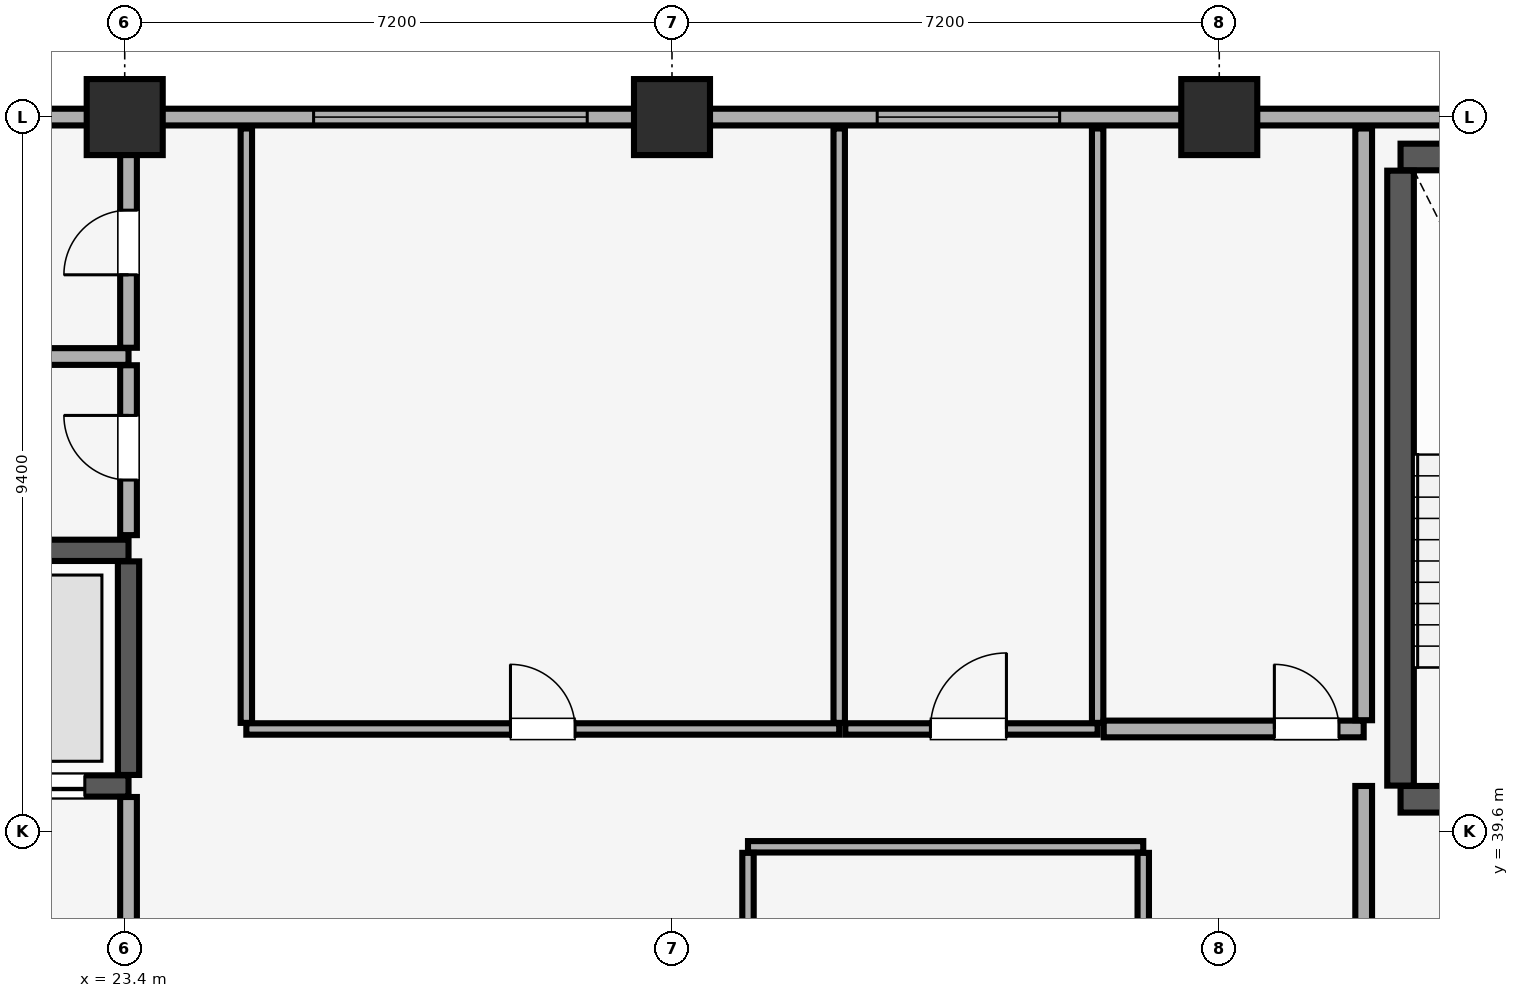
"""IFC4 building model, lengths in metres.
Left out: names, types, materials, properties, quantities, classifications, styles, units other than length and angle.
Written with IfcOpenShell. Run it as: python <this file> out.ifc"""

import sys

from ifc_helpers import new_model, si_unit, direction, frame, frame_2d, origin, origin_2d, place, context, subcontext, project, spatial, rectangle, extrude, element, fill, save


model = new_model("IFC4")
c1 = context("Model", 3, precision=1e-05, world=origin(), true_north=direction((0.0, 1.0)))
c2 = subcontext(c1, "Body", "Model", "MODEL_VIEW")
j1 = project(units=[si_unit("LENGTHUNIT", "METRE"), si_unit("PLANEANGLEUNIT", "RADIAN")], contexts=[c1])
p1 = place(None, origin())
s1 = spatial("IfcSite", under=j1, at=p1, CompositionType="ELEMENT")
p2 = place(p1, origin())
s2 = spatial("IfcBuilding", under=s1, at=p2, CompositionType="ELEMENT")
p3 = place(p2, frame((0.0, 0.0, 229.15)))
s3 = spatial("IfcBuildingStorey", under=s2, at=p3, CompositionType="ELEMENT", Elevation=229.15)
for number, where, z_axis, x_axis in (
    (1, (23.4, 49.0, 0.0), (0.0, 0.0, 1.0), (1.0, 0.0, 0.0)),
    (2, (30.6, 49.0, 0.0), (0.0, 0.0, 1.0), (1.0, 0.0, 0.0)),
    (3, (37.8, 49.0, 0.0), (0.0, 0.0, 1.0), (1.0, 0.0, 0.0)),
):
    element("IfcColumn", number, at=place(p3, frame(where, z_axis=z_axis, x_axis=x_axis)), inside=s3, PredefinedType="COLUMN", context=c2, shape_type="SweptSolid", body=[
        extrude(rectangle(XDim=1.0, YDim=1.0, at=origin_2d()), origin(), (0.0, 0.0, 1.0), 3.71),
    ])
p4 = place(p3, frame((74.2, 49.0, 0.0), z_axis=(0.0, 0.0, 1.0), x_axis=(-1.0, 0.0, 0.0)))
e4 = element("IfcWall", 4, at=p4, inside=s3, PredefinedType="SOLIDWALL", context=c2, shape_type="SweptSolid", body=[
    extrude(rectangle(XDim=64.4, YDim=0.22, at=frame_2d((32.2, 0.0))), origin(), (0.0, 0.0, 1.0), 2.91),
])
p5 = place(p4, frame((59.815, 0.0, 0.85)))
e5 = element("IfcOpeningElement", 5, at=p5, cuts=e4, PredefinedType="OPENING", context=c2, shape_type="SweptSolid", body=[
    extrude(rectangle(XDim=3.0, YDim=1.5, at=frame_2d((1.5, 0.75))), frame((0.0, 0.12, 0.0), z_axis=(0.0, -1.0, 0.0), x_axis=(1.0, 0.0, 0.0)), (0.0, 0.0, 1.0), 0.24),
])
p6 = place(p4, frame((1.585, 0.0, 0.85)))
e6 = element("IfcOpeningElement", 6, at=p6, cuts=e4, PredefinedType="OPENING", context=c2, shape_type="SweptSolid", body=[
    extrude(rectangle(XDim=3.0, YDim=1.5, at=frame_2d((1.5, 0.75))), frame((0.0, 0.12, 0.0), z_axis=(0.0, -1.0, 0.0), x_axis=(1.0, 0.0, 0.0)), (0.0, 0.0, 1.0), 0.24),
])
p7 = place(p4, frame((44.715, 0.0, 0.9)))
e7 = element("IfcOpeningElement", 7, at=p7, cuts=e4, PredefinedType="OPENING", context=c2, shape_type="SweptSolid", body=[
    extrude(rectangle(XDim=3.6, YDim=1.5, at=frame_2d((1.8, 0.75))), frame((0.0, 0.12, 0.0), z_axis=(0.0, -1.0, 0.0), x_axis=(1.0, 0.0, 0.0)), (0.0, 0.0, 1.0), 0.24),
])
p8 = place(p4, frame((38.5, 0.0, 0.9)))
e8 = element("IfcOpeningElement", 8, at=p8, cuts=e4, PredefinedType="OPENING", context=c2, shape_type="SweptSolid", body=[
    extrude(rectangle(XDim=2.4, YDim=1.5, at=frame_2d((1.2, 0.75))), frame((0.0, 0.12, 0.0), z_axis=(0.0, -1.0, 0.0), x_axis=(1.0, 0.0, 0.0)), (0.0, 0.0, 1.0), 0.24),
])
p9 = place(p4, frame((21.75, 0.0, 0.9)))
e9 = element("IfcOpeningElement", 9, at=p9, cuts=e4, PredefinedType="OPENING", context=c2, shape_type="SweptSolid", body=[
    extrude(rectangle(XDim=3.0, YDim=1.5, at=frame_2d((1.5, 0.75))), frame((0.0, 0.12, 0.0), z_axis=(0.0, -1.0, 0.0), x_axis=(1.0, 0.0, 0.0)), (0.0, 0.0, 1.0), 0.24),
])
p10 = place(p4, frame((17.435, 0.0, 0.9)))
e10 = element("IfcOpeningElement", 10, at=p10, cuts=e4, PredefinedType="OPENING", context=c2, shape_type="SweptSolid", body=[
    extrude(rectangle(XDim=2.4, YDim=1.5, at=frame_2d((1.2, 0.75))), frame((0.0, 0.12, 0.0), z_axis=(0.0, -1.0, 0.0), x_axis=(1.0, 0.0, 0.0)), (0.0, 0.0, 1.0), 0.24),
])
p11 = place(p3, frame((40.185, 40.025, 0.0), z_axis=(0.0, 0.0, 1.0), x_axis=(1.0, 0.0, 0.0)))
e11 = element("IfcWall", 11, at=p11, inside=s3, PredefinedType="SHEAR", context=c2, shape_type="SweptSolid", body=[
    extrude(rectangle(XDim=3.63, YDim=0.35, at=frame_2d((1.815, 0.0))), origin(), (0.0, 0.0, 1.0), 3.71),
])
p12 = place(p11, frame((1.24, 0.0, 0.0)))
e12 = element("IfcOpeningElement", 12, at=p12, cuts=e11, PredefinedType="OPENING", context=c2, shape_type="SweptSolid", body=[
    extrude(rectangle(XDim=1.15, YDim=2.15, at=frame_2d((0.575, 1.075))), frame((0.0, 0.185, 0.0), z_axis=(0.0, -1.0, 0.0), x_axis=(1.0, 0.0, 0.0)), (0.0, 0.0, 1.0), 0.37),
])
p13 = place(p3, frame((40.185, 48.475, 0.0), z_axis=(0.0, 0.0, 1.0), x_axis=(1.0, 0.0, 0.0)))
e13 = element("IfcWall", 13, at=p13, inside=s3, PredefinedType="SHEAR", context=c2, shape_type="SweptSolid", body=[
    extrude(rectangle(XDim=3.63, YDim=0.35, at=frame_2d((1.815, 0.0))), origin(), (0.0, 0.0, 1.0), 3.71),
])
p14 = place(p3, frame((40.185, 40.205, 0.0), z_axis=(0.0, 0.0, 1.0), x_axis=(0.0, 1.0, 0.0)))
e14 = element("IfcWall", 14, at=p14, inside=s3, PredefinedType="SHEAR", context=c2, shape_type="SweptSolid", body=[
    extrude(rectangle(XDim=8.09, YDim=0.35, at=frame_2d((4.045, 0.0))), origin(), (0.0, 0.0, 1.0), 3.71),
])
p15 = place(p3, frame((21.035, 40.2, 0.0), z_axis=(0.0, 0.0, 1.0), x_axis=(1.0, 0.0, 0.0)))
e15 = element("IfcWall", 15, at=p15, inside=s3, PredefinedType="SHEAR", context=c2, shape_type="SweptSolid", body=[
    extrude(rectangle(XDim=2.415, YDim=0.28, at=frame_2d((1.208, 0.0))), origin(), (0.0, 0.0, 1.0), 3.71),
])
p16 = place(p15, frame((0.54, 0.0, 0.0)))
e16 = element("IfcOpeningElement", 16, at=p16, cuts=e15, PredefinedType="OPENING", context=c2, shape_type="SweptSolid", body=[
    extrude(rectangle(XDim=1.3, YDim=2.3, at=frame_2d((0.65, 1.15))), frame((0.0, 0.15, 0.0), z_axis=(0.0, -1.0, 0.0), x_axis=(1.0, 0.0, 0.0)), (0.0, 0.0, 1.0), 0.3),
])
p17 = place(p3, frame((21.035, 43.3, 0.0), z_axis=(0.0, 0.0, 1.0), x_axis=(1.0, 0.0, 0.0)))
e17 = element("IfcWall", 17, at=p17, inside=s3, PredefinedType="SHEAR", context=c2, shape_type="SweptSolid", body=[
    extrude(rectangle(XDim=2.415, YDim=0.28, at=frame_2d((1.208, 0.0))), origin(), (0.0, 0.0, 1.0), 3.71),
])
p18 = place(p3, frame((23.45, 40.345, 0.0), z_axis=(0.0, 0.0, 1.0), x_axis=(0.0, 1.0, 0.0)))
e18 = element("IfcWall", 18, at=p18, inside=s3, PredefinedType="SHEAR", context=c2, shape_type="SweptSolid", body=[
    extrude(rectangle(XDim=2.81, YDim=0.28, at=frame_2d((1.405, 0.0))), origin(), (0.0, 0.0, 1.0), 3.71),
])
p19 = place(p3, frame((23.45, 34.415, 0.0), z_axis=(0.0, 0.0, 1.0), x_axis=(0.0, 1.0, 0.0)))
e19 = element("IfcWall", 19, at=p19, inside=s3, PredefinedType="PARTITIONING", context=c2, shape_type="SweptSolid", body=[
    extrude(rectangle(XDim=5.64, YDim=0.22, at=frame_2d((2.82, 0.0))), origin(), (0.0, 0.0, 1.0), 3.71),
])
p20 = place(p3, frame((39.7, 34.415, 0.0), z_axis=(0.0, 0.0, 1.0), x_axis=(0.0, 1.0, 0.0)))
e20 = element("IfcWall", 20, at=p20, inside=s3, PredefinedType="PARTITIONING", context=c2, shape_type="SweptSolid", body=[
    extrude(rectangle(XDim=5.785, YDim=0.22, at=frame_2d((2.893, 0.0))), origin(), (0.0, 0.0, 1.0), 3.71),
])
p21 = place(p3, frame((21.035, 45.85, 0.0), z_axis=(0.0, 0.0, 1.0), x_axis=(1.0, 0.0, 0.0)))
e21 = element("IfcWall", 21, at=p21, inside=s3, PredefinedType="PARTITIONING", context=c2, shape_type="SweptSolid", body=[
    extrude(rectangle(XDim=2.415, YDim=0.22, at=frame_2d((1.208, 0.0))), origin(), (0.0, 0.0, 1.0), 3.71),
])
p22 = place(p3, frame((23.45, 43.5, 0.0), z_axis=(0.0, 0.0, 1.0), x_axis=(0.0, 1.0, 0.0)))
e22 = element("IfcWall", 22, at=p22, inside=s3, PredefinedType="PARTITIONING", context=c2, shape_type="SweptSolid", body=[
    extrude(rectangle(XDim=2.235, YDim=0.22, at=frame_2d((1.118, 0.0))), origin(), (0.0, 0.0, 1.0), 3.71),
])
p23 = place(p22, frame((0.725, 0.0, 0.0)))
e23 = element("IfcOpeningElement", 23, at=p23, cuts=e22, PredefinedType="OPENING", context=c2, shape_type="SweptSolid", body=[
    extrude(rectangle(XDim=0.85, YDim=2.1, at=frame_2d((0.425, 1.05))), frame((0.0, 0.12, 0.0), z_axis=(0.0, -1.0, 0.0), x_axis=(1.0, 0.0, 0.0)), (0.0, 0.0, 1.0), 0.24),
])
p24 = place(p3, frame((23.45, 45.965, 0.0), z_axis=(0.0, 0.0, 1.0), x_axis=(0.0, 1.0, 0.0)))
e24 = element("IfcWall", 24, at=p24, inside=s3, PredefinedType="PARTITIONING", context=c2, shape_type="SweptSolid", body=[
    extrude(rectangle(XDim=2.885, YDim=0.22, at=frame_2d((1.442, 0.0))), origin(), (0.0, 0.0, 1.0), 3.71),
])
p25 = place(p24, frame((0.96, 0.0, 0.0)))
e25 = element("IfcOpeningElement", 25, at=p25, cuts=e24, PredefinedType="OPENING", context=c2, shape_type="SweptSolid", body=[
    extrude(rectangle(XDim=0.85, YDim=2.1, at=frame_2d((0.425, 1.05))), frame((0.0, 0.12, 0.0), z_axis=(0.0, -1.0, 0.0), x_axis=(1.0, 0.0, 0.0)), (0.0, 0.0, 1.0), 0.24),
])
p26 = place(p3, frame((31.6, 39.4, 0.0), z_axis=(0.0, 0.0, 1.0), x_axis=(1.0, 0.0, 0.0)))
e26 = element("IfcWall", 26, at=p26, inside=s3, PredefinedType="PARTITIONING", context=c2, shape_type="SweptSolid", body=[
    extrude(rectangle(XDim=5.2, YDim=0.15, at=frame_2d((2.6, 0.0))), origin(), (0.0, 0.0, 1.0), 3.71),
])
for number, where, z_axis, x_axis in (
    (27, (31.6, 34.38, 0.0), (0.0, 0.0, 1.0), (0.0, 1.0, 0.0)),
    (28, (36.8, 34.38, 0.0), (0.0, 0.0, 1.0), (0.0, 1.0, 0.0)),
):
    element("IfcWall", number, at=place(p3, frame(where, z_axis=z_axis, x_axis=x_axis)), inside=s3, PredefinedType="PARTITIONING", context=c2, shape_type="SweptSolid", body=[
        extrude(rectangle(XDim=4.94, YDim=0.15, at=frame_2d((2.47, 0.0))), origin(), (0.0, 0.0, 1.0), 3.71),
    ])
p27 = place(p3, frame((25.0, 40.95, 0.0), z_axis=(0.0, 0.0, 1.0), x_axis=(1.0, 0.0, 0.0)))
e29 = element("IfcWall", 29, at=p27, inside=s3, PredefinedType="PARTITIONING", context=c2, shape_type="SweptSolid", body=[
    extrude(rectangle(XDim=7.8, YDim=0.15, at=frame_2d((3.9, 0.0))), origin(), (0.0, 0.0, 1.0), 3.71),
])
p28 = place(p27, frame((3.475, 0.0, 0.0)))
e30 = element("IfcOpeningElement", 30, at=p28, cuts=e29, PredefinedType="OPENING", context=c2, shape_type="SweptSolid", body=[
    extrude(rectangle(XDim=0.85, YDim=2.1, at=frame_2d((0.425, 1.05))), frame((0.0, 0.085, 0.0), z_axis=(0.0, -1.0, 0.0), x_axis=(1.0, 0.0, 0.0)), (0.0, 0.0, 1.0), 0.17),
])
for number, where, z_axis, x_axis in (
    (31, (25.0, 41.03, 0.0), (0.0, 0.0, 1.0), (0.0, 1.0, 0.0)),
    (32, (32.8, 41.03, 0.0), (0.0, 0.0, 1.0), (0.0, 1.0, 0.0)),
):
    element("IfcWall", number, at=place(p3, frame(where, z_axis=z_axis, x_axis=x_axis)), inside=s3, PredefinedType="PARTITIONING", context=c2, shape_type="SweptSolid", body=[
        extrude(rectangle(XDim=7.82, YDim=0.15, at=frame_2d((3.91, 0.0))), origin(), (0.0, 0.0, 1.0), 3.71),
    ])
p29 = place(p3, frame((32.88, 40.95, 0.0), z_axis=(0.0, 0.0, 1.0), x_axis=(1.0, 0.0, 0.0)))
e33 = element("IfcWall", 33, at=p29, inside=s3, PredefinedType="PARTITIONING", context=c2, shape_type="SweptSolid", body=[
    extrude(rectangle(XDim=3.32, YDim=0.15, at=frame_2d((1.66, 0.0))), origin(), (0.0, 0.0, 1.0), 3.71),
])
p30 = place(p29, frame((1.12, 0.0, 0.0)))
e34 = element("IfcOpeningElement", 34, at=p30, cuts=e33, PredefinedType="OPENING", context=c2, shape_type="SweptSolid", body=[
    extrude(rectangle(XDim=1.0, YDim=2.15, at=frame_2d((0.5, 1.075))), frame((0.0, 0.085, 0.0), z_axis=(0.0, -1.0, 0.0), x_axis=(1.0, 0.0, 0.0)), (0.0, 0.0, 1.0), 0.17),
])
p31 = place(p3, frame((36.2, 41.03, 0.0), z_axis=(0.0, 0.0, 1.0), x_axis=(0.0, 1.0, 0.0)))
e35 = element("IfcWall", 35, at=p31, inside=s3, PredefinedType="PARTITIONING", context=c2, shape_type="SweptSolid", body=[
    extrude(rectangle(XDim=7.82, YDim=0.15, at=frame_2d((3.91, 0.0))), origin(), (0.0, 0.0, 1.0), 3.71),
])
p32 = place(p3, frame((36.28, 40.95, 0.0), z_axis=(0.0, 0.0, 1.0), x_axis=(1.0, 0.0, 0.0)))
e36 = element("IfcWall", 36, at=p32, inside=s3, PredefinedType="PARTITIONING", context=c2, shape_type="SweptSolid", body=[
    extrude(rectangle(XDim=3.42, YDim=0.22, at=frame_2d((1.71, 0.0))), origin(), (0.0, 0.0, 1.0), 3.71),
])
p33 = place(p32, frame((2.245, 0.0, 0.0)))
e37 = element("IfcOpeningElement", 37, at=p33, cuts=e36, PredefinedType="OPENING", context=c2, shape_type="SweptSolid", body=[
    extrude(rectangle(XDim=0.85, YDim=2.1, at=frame_2d((0.425, 1.05))), frame((0.0, 0.12, 0.0), z_axis=(0.0, -1.0, 0.0), x_axis=(1.0, 0.0, 0.0)), (0.0, 0.0, 1.0), 0.24),
])
p34 = place(p3, frame((39.7, 41.065, 0.0), z_axis=(0.0, 0.0, 1.0), x_axis=(0.0, 1.0, 0.0)))
e38 = element("IfcWall", 38, at=p34, inside=s3, PredefinedType="PARTITIONING", context=c2, shape_type="SweptSolid", body=[
    extrude(rectangle(XDim=7.785, YDim=0.22, at=frame_2d((3.893, 0.0))), origin(), (0.0, 0.0, 1.0), 3.71),
])
p35 = place(p7, origin())
e39 = element("IfcWindow", 39, at=p35, inside=s3, PartitioningType="SINGLE_PANEL", PredefinedType="WINDOW", context=c2, shape_type="SweptSolid", body=[
    extrude(rectangle(XDim=3.6, YDim=1.5, at=frame_2d((1.8, 0.75))), frame((0.0, 0.03, 0.0), z_axis=(0.0, -1.0, 0.0), x_axis=(1.0, 0.0, 0.0)), (0.0, 0.0, 1.0), 0.06),
])
fill(e7, e39)
p36 = place(p8, origin())
e40 = element("IfcWindow", 40, at=p36, inside=s3, PartitioningType="SINGLE_PANEL", PredefinedType="WINDOW", context=c2, shape_type="SweptSolid", body=[
    extrude(rectangle(XDim=2.4, YDim=1.5, at=frame_2d((1.2, 0.75))), frame((0.0, 0.03, 0.0), z_axis=(0.0, -1.0, 0.0), x_axis=(1.0, 0.0, 0.0)), (0.0, 0.0, 1.0), 0.06),
])
fill(e8, e40)
p37 = place(p16, origin())
e41 = element("IfcDoor", 41, at=p37, inside=s3, OperationType="DOUBLE_DOOR_SLIDING", PredefinedType="DOOR", context=c2, shape_type="SweptSolid", body=[
    extrude(rectangle(XDim=1.3, YDim=2.3, at=frame_2d((0.65, 1.15))), frame((0.0, 0.025, 0.0), z_axis=(0.0, -1.0, 0.0), x_axis=(1.0, 0.0, 0.0)), (0.0, 0.0, 1.0), 0.05),
])
fill(e16, e41)
p38 = place(p23, origin())
e42 = element("IfcDoor", 42, at=p38, inside=s3, OperationType="SINGLE_SWING_RIGHT", PredefinedType="DOOR", context=c2, shape_type="SweptSolid", body=[
    extrude(rectangle(XDim=0.85, YDim=2.1, at=frame_2d((0.425, 1.05))), frame((0.0, 0.025, 0.0), z_axis=(0.0, -1.0, 0.0), x_axis=(1.0, 0.0, 0.0)), (0.0, 0.0, 1.0), 0.05),
])
fill(e23, e42)
p39 = place(p25, origin())
e43 = element("IfcDoor", 43, at=p39, inside=s3, OperationType="SINGLE_SWING_LEFT", PredefinedType="DOOR", context=c2, shape_type="SweptSolid", body=[
    extrude(rectangle(XDim=0.85, YDim=2.1, at=frame_2d((0.425, 1.05))), frame((0.0, 0.025, 0.0), z_axis=(0.0, -1.0, 0.0), x_axis=(1.0, 0.0, 0.0)), (0.0, 0.0, 1.0), 0.05),
])
fill(e25, e43)
p40 = place(p28, origin())
e44 = element("IfcDoor", 44, at=p40, inside=s3, OperationType="SINGLE_SWING_LEFT", PredefinedType="DOOR", context=c2, shape_type="SweptSolid", body=[
    extrude(rectangle(XDim=0.85, YDim=2.1, at=frame_2d((0.425, 1.05))), frame((0.0, 0.025, 0.0), z_axis=(0.0, -1.0, 0.0), x_axis=(1.0, 0.0, 0.0)), (0.0, 0.0, 1.0), 0.05),
])
fill(e30, e44)
p41 = place(p30, origin())
e45 = element("IfcDoor", 45, at=p41, inside=s3, OperationType="SINGLE_SWING_RIGHT", PredefinedType="DOOR", context=c2, shape_type="SweptSolid", body=[
    extrude(rectangle(XDim=1.0, YDim=2.15, at=frame_2d((0.5, 1.075))), frame((0.0, 0.025, 0.0), z_axis=(0.0, -1.0, 0.0), x_axis=(1.0, 0.0, 0.0)), (0.0, 0.0, 1.0), 0.05),
])
fill(e34, e45)
p42 = place(p33, origin())
e46 = element("IfcDoor", 46, at=p42, inside=s3, OperationType="SINGLE_SWING_LEFT", PredefinedType="DOOR", context=c2, shape_type="SweptSolid", body=[
    extrude(rectangle(XDim=0.85, YDim=2.1, at=frame_2d((0.425, 1.05))), frame((0.0, 0.025, 0.0), z_axis=(0.0, -1.0, 0.0), x_axis=(1.0, 0.0, 0.0)), (0.0, 0.0, 1.0), 0.05),
])
fill(e37, e46)
save(model, sys.argv[1])
